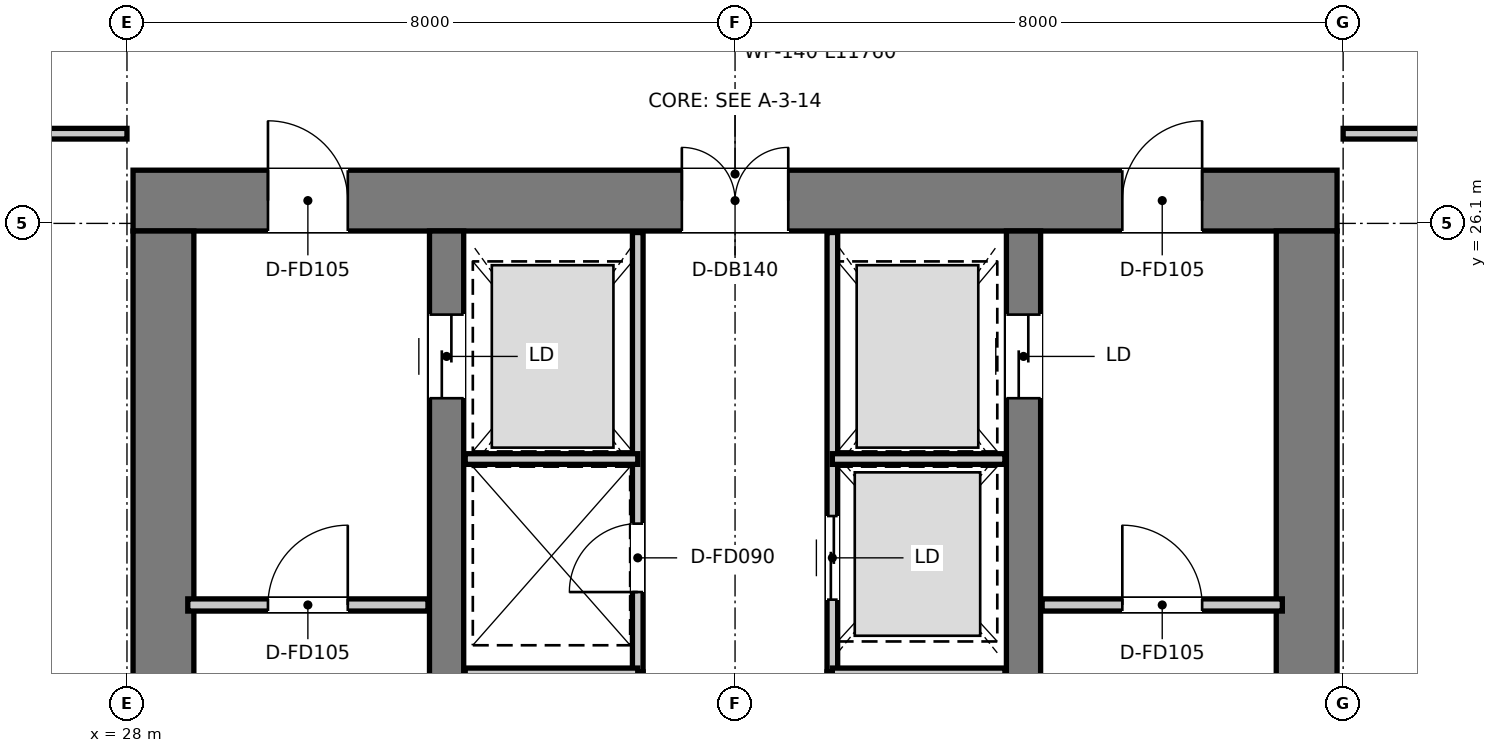
"""IFC4 building model, lengths in metres.
Left out: names, types, materials, properties, quantities, classifications, styles, units other than length and angle.
Written with IfcOpenShell. Run it as: python <this file> out.ifc"""

import sys

from ifc_helpers import new_model, si_unit, direction, frame, frame_2d, origin, place, context, subcontext, project, spatial, rectangle, extrude, element, fill, save


model = new_model("IFC4")
c1 = context("Model", 3, precision=1e-05, world=origin(), true_north=direction((0.0, 1.0)))
c2 = subcontext(c1, "Body", "Model", "MODEL_VIEW")
j1 = project(units=[si_unit("LENGTHUNIT", "METRE"), si_unit("PLANEANGLEUNIT", "RADIAN")], contexts=[c1])
p1 = place(None, origin())
s1 = spatial("IfcSite", under=j1, at=p1, CompositionType="ELEMENT")
p2 = place(p1, origin())
s2 = spatial("IfcBuilding", under=s1, at=p2, CompositionType="ELEMENT")
p3 = place(p2, frame((0.0, 0.0, 219.15)))
s3 = spatial("IfcBuildingStorey", under=s2, at=p3, CompositionType="ELEMENT", Elevation=219.15)
p4 = place(p3, frame((28.08, 26.4, 0.0), z_axis=(0.0, 0.0, 1.0), x_axis=(1.0, 0.0, 0.0)))
e1 = element("IfcWall", 1, at=p4, inside=s3, PredefinedType="SHEAR", context=c2, shape_type="SweptSolid", body=[
    extrude(rectangle(XDim=15.84, YDim=0.8, at=frame_2d((7.92, 0.0))), origin(), (0.0, 0.0, 1.0), 3.95),
])
p5 = place(p4, frame((7.22, 0.0, 0.0)))
e2 = element("IfcOpeningElement", 2, at=p5, cuts=e1, PredefinedType="OPENING", context=c2, shape_type="SweptSolid", body=[
    extrude(rectangle(XDim=1.4, YDim=2.2, at=frame_2d((0.7, 1.1))), frame((0.0, 0.41, 0.0), z_axis=(0.0, -1.0, 0.0), x_axis=(1.0, 0.0, 0.0)), (0.0, 0.0, 1.0), 0.82),
])
p6 = place(p4, frame((1.775, 0.0, 0.0)))
e3 = element("IfcOpeningElement", 3, at=p6, cuts=e1, PredefinedType="OPENING", context=c2, shape_type="SweptSolid", body=[
    extrude(rectangle(XDim=1.05, YDim=2.1, at=frame_2d((0.525, 1.05))), frame((0.0, 0.41, 0.0), z_axis=(0.0, -1.0, 0.0), x_axis=(1.0, 0.0, 0.0)), (0.0, 0.0, 1.0), 0.82),
])
p7 = place(p4, frame((13.015, 0.0, 0.0)))
e4 = element("IfcOpeningElement", 4, at=p7, cuts=e1, PredefinedType="OPENING", context=c2, shape_type="SweptSolid", body=[
    extrude(rectangle(XDim=1.05, YDim=2.1, at=frame_2d((0.525, 1.05))), frame((0.0, 0.41, 0.0), z_axis=(0.0, -1.0, 0.0), x_axis=(1.0, 0.0, 0.0)), (0.0, 0.0, 1.0), 0.82),
])
for number, where, z_axis, x_axis in (
    (5, (28.48, 11.3, 0.0), (0.0, 0.0, 1.0), (0.0, 1.0, 0.0)),
    (6, (43.52, 11.3, 0.0), (0.0, 0.0, 1.0), (0.0, 1.0, 0.0)),
):
    element("IfcWall", number, at=place(p3, frame(where, z_axis=z_axis, x_axis=x_axis)), inside=s3, PredefinedType="SHEAR", context=c2, shape_type="SweptSolid", body=[
        extrude(rectangle(XDim=14.7, YDim=0.8, at=frame_2d((7.35, 0.0))), origin(), (0.0, 0.0, 1.0), 3.95),
    ])
p8 = place(p3, frame((32.205, 13.22, 0.0), z_axis=(0.0, 0.0, 1.0), x_axis=(0.0, 1.0, 0.0)))
e7 = element("IfcWall", 7, at=p8, inside=s3, PredefinedType="SHEAR", context=c2, shape_type="SweptSolid", body=[
    extrude(rectangle(XDim=12.78, YDim=0.45, at=frame_2d((6.39, 0.0))), origin(), (0.0, 0.0, 1.0), 3.95),
])
p9 = place(p8, frame((10.58, 0.0, 0.0)))
e8 = element("IfcOpeningElement", 8, at=p9, cuts=e7, PredefinedType="OPENING", context=c2, shape_type="SweptSolid", body=[
    extrude(rectangle(XDim=1.1, YDim=2.15, at=frame_2d((0.55, 1.075))), frame((0.0, 0.235, 0.0), z_axis=(0.0, -1.0, 0.0), x_axis=(1.0, 0.0, 0.0)), (0.0, 0.0, 1.0), 0.47),
])
p10 = place(p3, frame((39.795, 13.22, 0.0), z_axis=(0.0, 0.0, 1.0), x_axis=(0.0, 1.0, 0.0)))
e9 = element("IfcWall", 9, at=p10, inside=s3, PredefinedType="SHEAR", context=c2, shape_type="SweptSolid", body=[
    extrude(rectangle(XDim=12.78, YDim=0.45, at=frame_2d((6.39, 0.0))), origin(), (0.0, 0.0, 1.0), 3.95),
])
p11 = place(p10, frame((10.58, 0.0, 0.0)))
e10 = element("IfcOpeningElement", 10, at=p11, cuts=e9, PredefinedType="OPENING", context=c2, shape_type="SweptSolid", body=[
    extrude(rectangle(XDim=1.1, YDim=2.15, at=frame_2d((0.55, 1.075))), frame((0.0, 0.235, 0.0), z_axis=(0.0, -1.0, 0.0), x_axis=(1.0, 0.0, 0.0)), (0.0, 0.0, 1.0), 0.47),
])
p12 = place(p3, frame((28.8, 21.08, 0.0), z_axis=(0.0, 0.0, 1.0), x_axis=(1.0, 0.0, 0.0)))
e11 = element("IfcWall", 11, at=p12, inside=s3, PredefinedType="PARTITIONING", context=c2, shape_type="SweptSolid", body=[
    extrude(rectangle(XDim=3.16, YDim=0.16, at=frame_2d((1.58, 0.0))), origin(), (0.0, 0.0, 1.0), 3.67),
])
p13 = place(p12, frame((1.055, 0.0, 0.0)))
e12 = element("IfcOpeningElement", 12, at=p13, cuts=e11, PredefinedType="OPENING", context=c2, shape_type="SweptSolid", body=[
    extrude(rectangle(XDim=1.05, YDim=2.1, at=frame_2d((0.525, 1.05))), frame((0.0, 0.09, 0.0), z_axis=(0.0, -1.0, 0.0), x_axis=(1.0, 0.0, 0.0)), (0.0, 0.0, 1.0), 0.18),
])
p14 = place(p3, frame((40.04, 21.08, 0.0), z_axis=(0.0, 0.0, 1.0), x_axis=(1.0, 0.0, 0.0)))
e13 = element("IfcWall", 13, at=p14, inside=s3, PredefinedType="PARTITIONING", context=c2, shape_type="SweptSolid", body=[
    extrude(rectangle(XDim=3.16, YDim=0.16, at=frame_2d((1.58, 0.0))), origin(), (0.0, 0.0, 1.0), 3.67),
])
p15 = place(p14, frame((1.055, 0.0, 0.0)))
e14 = element("IfcOpeningElement", 14, at=p15, cuts=e13, PredefinedType="OPENING", context=c2, shape_type="SweptSolid", body=[
    extrude(rectangle(XDim=1.05, YDim=2.1, at=frame_2d((0.525, 1.05))), frame((0.0, 0.09, 0.0), z_axis=(0.0, -1.0, 0.0), x_axis=(1.0, 0.0, 0.0)), (0.0, 0.0, 1.0), 0.18),
])
p16 = place(p3, frame((34.72, 20.2, 0.0), z_axis=(0.0, 0.0, 1.0), x_axis=(0.0, 1.0, 0.0)))
e15 = element("IfcWall", 15, at=p16, inside=s3, PredefinedType="PARTITIONING", context=c2, shape_type="SweptSolid", body=[
    extrude(rectangle(XDim=5.78, YDim=0.14, at=frame_2d((2.89, 0.0))), origin(), (0.0, 0.0, 1.0), 2.67),
])
p17 = place(p16, frame((1.05, 0.0, 0.0)))
e16 = element("IfcOpeningElement", 16, at=p17, cuts=e15, PredefinedType="OPENING", context=c2, shape_type="SweptSolid", body=[
    extrude(rectangle(XDim=0.9, YDim=2.1, at=frame_2d((0.45, 1.05))), frame((0.0, 0.08, 0.0), z_axis=(0.0, -1.0, 0.0), x_axis=(1.0, 0.0, 0.0)), (0.0, 0.0, 1.0), 0.16),
])
p18 = place(p3, frame((37.28, 20.2, 0.0), z_axis=(0.0, 0.0, 1.0), x_axis=(0.0, 1.0, 0.0)))
e17 = element("IfcWall", 17, at=p18, inside=s3, PredefinedType="PARTITIONING", context=c2, shape_type="SweptSolid", body=[
    extrude(rectangle(XDim=5.78, YDim=0.14, at=frame_2d((2.89, 0.0))), origin(), (0.0, 0.0, 1.0), 2.67),
])
p19 = place(p18, frame((0.95, 0.0, 0.0)))
e18 = element("IfcOpeningElement", 18, at=p19, cuts=e17, PredefinedType="OPENING", context=c2, shape_type="SweptSolid", body=[
    extrude(rectangle(XDim=1.1, YDim=2.15, at=frame_2d((0.55, 1.075))), frame((0.0, 0.08, 0.0), z_axis=(0.0, -1.0, 0.0), x_axis=(1.0, 0.0, 0.0)), (0.0, 0.0, 1.0), 0.16),
])
for number, where, z_axis, x_axis in (
    (19, (32.45, 23.0, 0.0), (0.0, 0.0, 1.0), (1.0, 0.0, 0.0)),
    (20, (37.28, 23.0, 0.0), (0.0, 0.0, 1.0), (1.0, 0.0, 0.0)),
):
    element("IfcWall", number, at=place(p3, frame(where, z_axis=z_axis, x_axis=x_axis)), inside=s3, PredefinedType="PARTITIONING", context=c2, shape_type="SweptSolid", body=[
        extrude(rectangle(XDim=2.27, YDim=0.14, at=frame_2d((1.135, 0.0))), origin(), (0.0, 0.0, 1.0), 2.67),
    ])
for number, where, z_axis, x_axis in (
    (21, (34.72, 17.78, 0.0), (0.0, 0.0, 1.0), (0.0, 1.0, 0.0)),
    (22, (37.28, 17.78, 0.0), (0.0, 0.0, 1.0), (0.0, 1.0, 0.0)),
):
    element("IfcWall", number, at=place(p3, frame(where, z_axis=z_axis, x_axis=x_axis)), inside=s3, PredefinedType="PARTITIONING", context=c2, shape_type="SweptSolid", body=[
        extrude(rectangle(XDim=2.42, YDim=0.14, at=frame_2d((1.21, 0.0))), origin(), (0.0, 0.0, 1.0), 3.67),
    ])
for number, where, z_axis, x_axis in (
    (23, (32.45, 20.18, 0.0), (0.0, 0.0, 1.0), (1.0, 0.0, 0.0)),
    (24, (37.28, 20.18, 0.0), (0.0, 0.0, 1.0), (1.0, 0.0, 0.0)),
):
    element("IfcWall", number, at=place(p3, frame(where, z_axis=z_axis, x_axis=x_axis)), inside=s3, PredefinedType="PARTITIONING", context=c2, shape_type="SweptSolid", body=[
        extrude(rectangle(XDim=2.27, YDim=0.14, at=frame_2d((1.135, 0.0))), origin(), (0.0, 0.0, 1.0), 3.67),
    ])
p20 = place(p3, frame((12.757, 27.28, 0.0), z_axis=(0.0, 0.0, 1.0), x_axis=(1.0, 0.0, 0.0)))
e25 = element("IfcWall", 25, at=p20, inside=s3, PredefinedType="PARTITIONING", context=c2, shape_type="SweptSolid", body=[
    extrude(rectangle(XDim=15.243, YDim=0.14, at=frame_2d((7.622, 0.0))), origin(), (0.0, 0.0, 1.0), 3.03),
])
p21 = place(p20, frame((2.056, 0.0, 0.0)))
e26 = element("IfcOpeningElement", 26, at=p21, cuts=e25, PredefinedType="OPENING", context=c2, shape_type="SweptSolid", body=[
    extrude(rectangle(XDim=0.9, YDim=2.1, at=frame_2d((0.45, 1.05))), frame((0.0, 0.08, 0.0), z_axis=(0.0, -1.0, 0.0), x_axis=(1.0, 0.0, 0.0)), (0.0, 0.0, 1.0), 0.16),
])
p22 = place(p20, frame((9.593, 0.0, 0.0)))
e27 = element("IfcOpeningElement", 27, at=p22, cuts=e25, PredefinedType="OPENING", context=c2, shape_type="SweptSolid", body=[
    extrude(rectangle(XDim=0.9, YDim=2.1, at=frame_2d((0.45, 1.05))), frame((0.0, 0.08, 0.0), z_axis=(0.0, -1.0, 0.0), x_axis=(1.0, 0.0, 0.0)), (0.0, 0.0, 1.0), 0.16),
])
p23 = place(p20, frame((12.493, 0.0, 0.0)))
e28 = element("IfcOpeningElement", 28, at=p23, cuts=e25, PredefinedType="OPENING", context=c2, shape_type="SweptSolid", body=[
    extrude(rectangle(XDim=0.9, YDim=2.1, at=frame_2d((0.45, 1.05))), frame((0.0, 0.08, 0.0), z_axis=(0.0, -1.0, 0.0), x_axis=(1.0, 0.0, 0.0)), (0.0, 0.0, 1.0), 0.16),
])
p24 = place(p3, frame((44.0, 27.28, 0.0), z_axis=(0.0, 0.0, 1.0), x_axis=(1.0, 0.0, 0.0)))
e29 = element("IfcWall", 29, at=p24, inside=s3, PredefinedType="PARTITIONING", context=c2, shape_type="SweptSolid", body=[
    extrude(rectangle(XDim=13.977, YDim=0.14, at=frame_2d((6.988, 0.0))), origin(), (0.0, 0.0, 1.0), 3.03),
])
p25 = place(p24, frame((4.75, 0.0, 0.0)))
e30 = element("IfcOpeningElement", 30, at=p25, cuts=e29, PredefinedType="OPENING", context=c2, shape_type="SweptSolid", body=[
    extrude(rectangle(XDim=0.9, YDim=2.1, at=frame_2d((0.45, 1.05))), frame((0.0, 0.08, 0.0), z_axis=(0.0, -1.0, 0.0), x_axis=(1.0, 0.0, 0.0)), (0.0, 0.0, 1.0), 0.16),
])
p26 = place(p13, origin())
e31 = element("IfcDoor", 31, at=p26, inside=s3, OperationType="SINGLE_SWING_RIGHT", PredefinedType="DOOR", context=c2, shape_type="SweptSolid", body=[
    extrude(rectangle(XDim=1.05, YDim=2.1, at=frame_2d((0.525, 1.05))), frame((0.0, 0.025, 0.0), z_axis=(0.0, -1.0, 0.0), x_axis=(1.0, 0.0, 0.0)), (0.0, 0.0, 1.0), 0.05),
])
fill(e12, e31)
p27 = place(p15, origin())
e32 = element("IfcDoor", 32, at=p27, inside=s3, OperationType="SINGLE_SWING_LEFT", PredefinedType="DOOR", context=c2, shape_type="SweptSolid", body=[
    extrude(rectangle(XDim=1.05, YDim=2.1, at=frame_2d((0.525, 1.05))), frame((0.0, 0.025, 0.0), z_axis=(0.0, -1.0, 0.0), x_axis=(1.0, 0.0, 0.0)), (0.0, 0.0, 1.0), 0.05),
])
fill(e14, e32)
p28 = place(p5, origin())
e33 = element("IfcDoor", 33, at=p28, inside=s3, OperationType="DOUBLE_DOOR_SINGLE_SWING", PredefinedType="DOOR", context=c2, shape_type="SweptSolid", body=[
    extrude(rectangle(XDim=1.4, YDim=2.2, at=frame_2d((0.7, 1.1))), frame((0.0, 0.025, 0.0), z_axis=(0.0, -1.0, 0.0), x_axis=(1.0, 0.0, 0.0)), (0.0, 0.0, 1.0), 0.05),
])
fill(e2, e33)
p29 = place(p6, origin())
e34 = element("IfcDoor", 34, at=p29, inside=s3, OperationType="SINGLE_SWING_LEFT", PredefinedType="DOOR", context=c2, shape_type="SweptSolid", body=[
    extrude(rectangle(XDim=1.05, YDim=2.1, at=frame_2d((0.525, 1.05))), frame((0.0, 0.025, 0.0), z_axis=(0.0, -1.0, 0.0), x_axis=(1.0, 0.0, 0.0)), (0.0, 0.0, 1.0), 0.05),
])
fill(e3, e34)
p30 = place(p7, origin())
e35 = element("IfcDoor", 35, at=p30, inside=s3, OperationType="SINGLE_SWING_RIGHT", PredefinedType="DOOR", context=c2, shape_type="SweptSolid", body=[
    extrude(rectangle(XDim=1.05, YDim=2.1, at=frame_2d((0.525, 1.05))), frame((0.0, 0.025, 0.0), z_axis=(0.0, -1.0, 0.0), x_axis=(1.0, 0.0, 0.0)), (0.0, 0.0, 1.0), 0.05),
])
fill(e4, e35)
p31 = place(p9, origin())
e36 = element("IfcDoor", 36, at=p31, inside=s3, OperationType="DOUBLE_DOOR_SLIDING", PredefinedType="DOOR", context=c2, shape_type="SweptSolid", body=[
    extrude(rectangle(XDim=1.1, YDim=2.15, at=frame_2d((0.55, 1.075))), frame((0.0, 0.025, 0.0), z_axis=(0.0, -1.0, 0.0), x_axis=(1.0, 0.0, 0.0)), (0.0, 0.0, 1.0), 0.05),
])
fill(e8, e36)
p32 = place(p11, origin())
e37 = element("IfcDoor", 37, at=p32, inside=s3, OperationType="DOUBLE_DOOR_SLIDING", PredefinedType="DOOR", context=c2, shape_type="SweptSolid", body=[
    extrude(rectangle(XDim=1.1, YDim=2.15, at=frame_2d((0.55, 1.075))), frame((0.0, 0.025, 0.0), z_axis=(0.0, -1.0, 0.0), x_axis=(1.0, 0.0, 0.0)), (0.0, 0.0, 1.0), 0.05),
])
fill(e10, e37)
p33 = place(p17, origin())
e38 = element("IfcDoor", 38, at=p33, inside=s3, OperationType="SINGLE_SWING_LEFT", PredefinedType="DOOR", context=c2, shape_type="SweptSolid", body=[
    extrude(rectangle(XDim=0.9, YDim=2.1, at=frame_2d((0.45, 1.05))), frame((0.0, 0.025, 0.0), z_axis=(0.0, -1.0, 0.0), x_axis=(1.0, 0.0, 0.0)), (0.0, 0.0, 1.0), 0.05),
])
fill(e16, e38)
p34 = place(p19, origin())
e39 = element("IfcDoor", 39, at=p34, inside=s3, OperationType="DOUBLE_DOOR_SLIDING", PredefinedType="DOOR", context=c2, shape_type="SweptSolid", body=[
    extrude(rectangle(XDim=1.1, YDim=2.15, at=frame_2d((0.55, 1.075))), frame((0.0, 0.025, 0.0), z_axis=(0.0, -1.0, 0.0), x_axis=(1.0, 0.0, 0.0)), (0.0, 0.0, 1.0), 0.05),
])
fill(e18, e39)
save(model, sys.argv[1])
